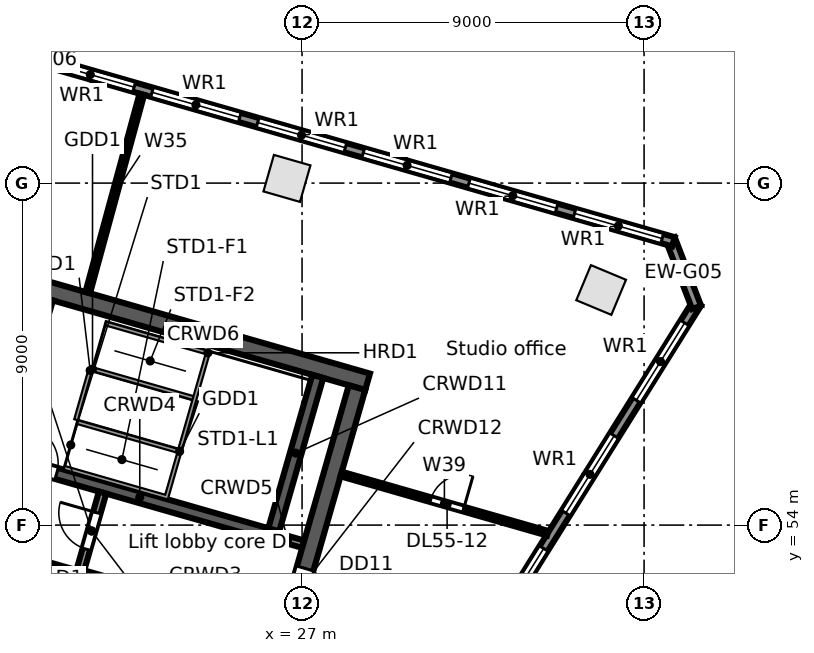
"""IFC4 building model, lengths in metres.
Left out: names, types, materials, properties, quantities, classifications, styles, units other than length and angle.
Written with IfcOpenShell. Run it as: python <this file> out.ifc"""

import sys

from ifc_helpers import new_model, si_unit, direction, frame, frame_2d, origin, origin_2d, place, context, subcontext, project, spatial, rectangle, extrude, element, fill, save


model = new_model("IFC4")
c1 = context("Model", 3, precision=1e-05, world=origin(), true_north=direction((0.0, 1.0)))
c2 = subcontext(c1, "Body", "Model", "MODEL_VIEW")
j1 = project(units=[si_unit("LENGTHUNIT", "METRE"), si_unit("PLANEANGLEUNIT", "RADIAN")], contexts=[c1])
p1 = place(None, origin())
s1 = spatial("IfcSite", under=j1, at=p1, CompositionType="ELEMENT")
p2 = place(p1, origin())
s2 = spatial("IfcBuilding", under=s1, at=p2, CompositionType="ELEMENT")
p3 = place(p2, frame((0.0, 0.0, 254.3)))
s3 = spatial("IfcBuildingStorey", under=s2, at=p3, CompositionType="ELEMENT", Elevation=254.3)
for number, where, z_axis, x_axis in (
    (1, (26.603, 63.124, 0.0), (0.0, 0.0, 1.0), (-0.961, 0.276, 0.0)),
    (2, (34.87, 60.187, 0.0), (0.0, 0.0, 1.0), (-0.923, 0.385, 0.0)),
):
    element("IfcColumn", number, at=place(p3, frame(where, z_axis=z_axis, x_axis=x_axis)), inside=s3, PredefinedType="COLUMN", context=c2, shape_type="SweptSolid", body=[
        extrude(rectangle(XDim=1.0, YDim=1.0, at=origin_2d()), origin(), (0.0, 0.0, 1.0), 3.9),
    ])
p4 = place(p3, frame((37.392, 59.84, 0.0), z_axis=(0.0, 0.0, 1.0), x_axis=(-0.529919909431, -0.848047692992, 0.0)))
e3 = element("IfcWall", 3, at=p4, inside=s3, PredefinedType="STANDARD", context=c2, shape_type="SweptSolid", body=[
    extrude(rectangle(XDim=21.104, YDim=0.25, at=frame_2d((10.552, 0.0))), origin(), (0.0, 0.0, 1.0), 3.55),
])
p5 = place(p4, frame((18.112, 0.0, 0.8)))
e4 = element("IfcOpeningElement", 4, at=p5, cuts=e3, PredefinedType="OPENING", context=c2, shape_type="SweptSolid", body=[
    extrude(rectangle(XDim=2.4, YDim=2.2, at=frame_2d((1.2, 1.1))), frame((0.0, 0.135, 0.0), z_axis=(0.0, -1.0, 0.0), x_axis=(1.0, 0.0, 0.0)), (0.0, 0.0, 1.0), 0.27),
])
p6 = place(p4, frame((14.612, 0.0, 0.8)))
e5 = element("IfcOpeningElement", 5, at=p6, cuts=e3, PredefinedType="OPENING", context=c2, shape_type="SweptSolid", body=[
    extrude(rectangle(XDim=2.4, YDim=2.2, at=frame_2d((1.2, 1.1))), frame((0.0, 0.135, 0.0), z_axis=(0.0, -1.0, 0.0), x_axis=(1.0, 0.0, 0.0)), (0.0, 0.0, 1.0), 0.27),
])
p7 = place(p4, frame((11.112, 0.0, 0.8)))
e6 = element("IfcOpeningElement", 6, at=p7, cuts=e3, PredefinedType="OPENING", context=c2, shape_type="SweptSolid", body=[
    extrude(rectangle(XDim=2.4, YDim=2.2, at=frame_2d((1.2, 1.1))), frame((0.0, 0.135, 0.0), z_axis=(0.0, -1.0, 0.0), x_axis=(1.0, 0.0, 0.0)), (0.0, 0.0, 1.0), 0.27),
])
p8 = place(p4, frame((7.612, 0.0, 0.8)))
e7 = element("IfcOpeningElement", 7, at=p8, cuts=e3, PredefinedType="OPENING", context=c2, shape_type="SweptSolid", body=[
    extrude(rectangle(XDim=2.4, YDim=2.2, at=frame_2d((1.2, 1.1))), frame((0.0, 0.135, 0.0), z_axis=(0.0, -1.0, 0.0), x_axis=(1.0, 0.0, 0.0)), (0.0, 0.0, 1.0), 0.27),
])
p9 = place(p4, frame((4.112, 0.0, 0.8)))
e8 = element("IfcOpeningElement", 8, at=p9, cuts=e3, PredefinedType="OPENING", context=c2, shape_type="SweptSolid", body=[
    extrude(rectangle(XDim=2.4, YDim=2.2, at=frame_2d((1.2, 1.1))), frame((0.0, 0.135, 0.0), z_axis=(0.0, -1.0, 0.0), x_axis=(1.0, 0.0, 0.0)), (0.0, 0.0, 1.0), 0.27),
])
p10 = place(p4, frame((0.612, 0.0, 0.8)))
e9 = element("IfcOpeningElement", 9, at=p10, cuts=e3, PredefinedType="OPENING", context=c2, shape_type="SweptSolid", body=[
    extrude(rectangle(XDim=2.4, YDim=2.2, at=frame_2d((1.2, 1.1))), frame((0.0, 0.135, 0.0), z_axis=(0.0, -1.0, 0.0), x_axis=(1.0, 0.0, 0.0)), (0.0, 0.0, 1.0), 0.27),
])
p11 = place(p3, frame((36.69, 61.531, 0.0), z_axis=(0.0, 0.0, 1.0), x_axis=(0.358377147136, -0.933576895821, 0.0)))
e10 = element("IfcWall", 10, at=p11, inside=s3, PredefinedType="STANDARD", context=c2, shape_type="SweptSolid", body=[
    extrude(rectangle(XDim=1.93, YDim=0.25, at=frame_2d((0.965, 0.0))), origin(), (0.0, 0.0, 1.0), 3.55),
])
p12 = place(p3, frame((3.34, 71.042, 0.0), z_axis=(0.0, 0.0, 1.0), x_axis=(0.96126179431, -0.275637012753, 0.0)))
e11 = element("IfcWall", 11, at=p12, inside=s3, PredefinedType="STANDARD", context=c2, shape_type="SweptSolid", body=[
    extrude(rectangle(XDim=34.779, YDim=0.25, at=frame_2d((17.39, 0.0))), origin(), (0.0, 0.0, 1.0), 3.55),
])
p13 = place(p12, frame((32.071, 0.0, 0.8)))
e12 = element("IfcOpeningElement", 12, at=p13, cuts=e11, PredefinedType="OPENING", context=c2, shape_type="SweptSolid", body=[
    extrude(rectangle(XDim=2.4, YDim=2.2, at=frame_2d((1.2, 1.1))), frame((0.0, 0.135, 0.0), z_axis=(0.0, -1.0, 0.0), x_axis=(1.0, 0.0, 0.0)), (0.0, 0.0, 1.0), 0.27),
])
p14 = place(p12, frame((29.18, 0.0, 0.8)))
e13 = element("IfcOpeningElement", 13, at=p14, cuts=e11, PredefinedType="OPENING", context=c2, shape_type="SweptSolid", body=[
    extrude(rectangle(XDim=2.4, YDim=2.2, at=frame_2d((1.2, 1.1))), frame((0.0, 0.135, 0.0), z_axis=(0.0, -1.0, 0.0), x_axis=(1.0, 0.0, 0.0)), (0.0, 0.0, 1.0), 0.27),
])
p15 = place(p12, frame((26.289, 0.0, 0.8)))
e14 = element("IfcOpeningElement", 14, at=p15, cuts=e11, PredefinedType="OPENING", context=c2, shape_type="SweptSolid", body=[
    extrude(rectangle(XDim=2.4, YDim=2.2, at=frame_2d((1.2, 1.1))), frame((0.0, 0.135, 0.0), z_axis=(0.0, -1.0, 0.0), x_axis=(1.0, 0.0, 0.0)), (0.0, 0.0, 1.0), 0.27),
])
p16 = place(p12, frame((23.398, 0.0, 0.8)))
e15 = element("IfcOpeningElement", 15, at=p16, cuts=e11, PredefinedType="OPENING", context=c2, shape_type="SweptSolid", body=[
    extrude(rectangle(XDim=2.4, YDim=2.2, at=frame_2d((1.2, 1.1))), frame((0.0, 0.135, 0.0), z_axis=(0.0, -1.0, 0.0), x_axis=(1.0, 0.0, 0.0)), (0.0, 0.0, 1.0), 0.27),
])
p17 = place(p12, frame((20.508, 0.0, 0.8)))
e16 = element("IfcOpeningElement", 16, at=p17, cuts=e11, PredefinedType="OPENING", context=c2, shape_type="SweptSolid", body=[
    extrude(rectangle(XDim=2.4, YDim=2.2, at=frame_2d((1.2, 1.1))), frame((0.0, 0.135, 0.0), z_axis=(0.0, -1.0, 0.0), x_axis=(1.0, 0.0, 0.0)), (0.0, 0.0, 1.0), 0.27),
])
p18 = place(p12, frame((17.616, 0.0, 0.8)))
e17 = element("IfcOpeningElement", 17, at=p18, cuts=e11, PredefinedType="OPENING", context=c2, shape_type="SweptSolid", body=[
    extrude(rectangle(XDim=2.4, YDim=2.2, at=frame_2d((1.2, 1.1))), frame((0.0, 0.135, 0.0), z_axis=(0.0, -1.0, 0.0), x_axis=(1.0, 0.0, 0.0)), (0.0, 0.0, 1.0), 0.27),
])
p19 = place(p12, frame((14.726, 0.0, 0.8)))
e18 = element("IfcOpeningElement", 18, at=p19, cuts=e11, PredefinedType="OPENING", context=c2, shape_type="SweptSolid", body=[
    extrude(rectangle(XDim=2.4, YDim=2.2, at=frame_2d((1.2, 1.1))), frame((0.0, 0.135, 0.0), z_axis=(0.0, -1.0, 0.0), x_axis=(1.0, 0.0, 0.0)), (0.0, 0.0, 1.0), 0.27),
])
p20 = place(p12, frame((11.834, 0.0, 0.8)))
e19 = element("IfcOpeningElement", 19, at=p20, cuts=e11, PredefinedType="OPENING", context=c2, shape_type="SweptSolid", body=[
    extrude(rectangle(XDim=2.4, YDim=2.2, at=frame_2d((1.2, 1.1))), frame((0.0, 0.135, 0.0), z_axis=(0.0, -1.0, 0.0), x_axis=(1.0, 0.0, 0.0)), (0.0, 0.0, 1.0), 0.27),
])
p21 = place(p12, frame((8.944, 0.0, 0.8)))
e20 = element("IfcOpeningElement", 20, at=p21, cuts=e11, PredefinedType="OPENING", context=c2, shape_type="SweptSolid", body=[
    extrude(rectangle(XDim=2.4, YDim=2.2, at=frame_2d((1.2, 1.1))), frame((0.0, 0.135, 0.0), z_axis=(0.0, -1.0, 0.0), x_axis=(1.0, 0.0, 0.0)), (0.0, 0.0, 1.0), 0.27),
])
p22 = place(p12, frame((6.052, 0.0, 0.8)))
e21 = element("IfcOpeningElement", 21, at=p22, cuts=e11, PredefinedType="OPENING", context=c2, shape_type="SweptSolid", body=[
    extrude(rectangle(XDim=2.4, YDim=2.2, at=frame_2d((1.2, 1.1))), frame((0.0, 0.135, 0.0), z_axis=(0.0, -1.0, 0.0), x_axis=(1.0, 0.0, 0.0)), (0.0, 0.0, 1.0), 0.27),
])
p23 = place(p12, frame((3.162, 0.0, 0.8)))
e22 = element("IfcOpeningElement", 22, at=p23, cuts=e11, PredefinedType="OPENING", context=c2, shape_type="SweptSolid", body=[
    extrude(rectangle(XDim=2.4, YDim=2.2, at=frame_2d((1.2, 1.1))), frame((0.0, 0.135, 0.0), z_axis=(0.0, -1.0, 0.0), x_axis=(1.0, 0.0, 0.0)), (0.0, 0.0, 1.0), 0.27),
])
p24 = place(p12, frame((0.271, 0.0, 0.8)))
e23 = element("IfcOpeningElement", 23, at=p24, cuts=e11, PredefinedType="OPENING", context=c2, shape_type="SweptSolid", body=[
    extrude(rectangle(XDim=2.4, YDim=2.2, at=frame_2d((1.2, 1.1))), frame((0.0, 0.135, 0.0), z_axis=(0.0, -1.0, 0.0), x_axis=(1.0, 0.0, 0.0)), (0.0, 0.0, 1.0), 0.27),
])
p25 = place(p3, frame((18.583, 53.423, 0.0), z_axis=(0.0, 0.0, 1.0), x_axis=(0.961259287968, -0.275645753268, 0.0)))
e24 = element("IfcWall", 24, at=p25, inside=s3, PredefinedType="SOLIDWALL", context=c2, shape_type="SweptSolid", body=[
    extrude(rectangle(XDim=2.65, YDim=0.2, at=frame_2d((1.325, 0.0))), origin(), (0.0, 0.0, 1.0), 3.55),
])
p26 = place(p3, frame((21.131, 52.692, 0.0), z_axis=(0.0, 0.0, 1.0), x_axis=(0.961261488075, -0.275638080722, 0.0)))
e25 = element("IfcWall", 25, at=p26, inside=s3, PredefinedType="SOLIDWALL", context=c2, shape_type="SweptSolid", body=[
    extrude(rectangle(XDim=5.45, YDim=0.3, at=frame_2d((2.725, 0.0))), origin(), (0.0, 0.0, 1.0), 3.55),
])
p27 = place(p26, frame((0.95, 0.0, 0.0)))
e26 = element("IfcOpeningElement", 26, at=p27, cuts=e25, PredefinedType="OPENING", context=c2, shape_type="SweptSolid", body=[
    extrude(rectangle(XDim=0.9, YDim=2.1, at=frame_2d((0.45, 1.05))), frame((0.0, 0.16, 0.0), z_axis=(0.0, -1.0, 0.0), x_axis=(1.0, 0.0, 0.0)), (0.0, 0.0, 1.0), 0.32),
])
p28 = place(p26, frame((3.75, 0.0, 0.0)))
e27 = element("IfcOpeningElement", 27, at=p28, cuts=e25, PredefinedType="OPENING", context=c2, shape_type="SweptSolid", body=[
    extrude(rectangle(XDim=0.9, YDim=2.1, at=frame_2d((0.45, 1.05))), frame((0.0, 0.16, 0.0), z_axis=(0.0, -1.0, 0.0), x_axis=(1.0, 0.0, 0.0)), (0.0, 0.0, 1.0), 0.32),
])
p29 = place(p3, frame((19.245, 55.73, 0.0), z_axis=(0.0, 0.0, 1.0), x_axis=(0.961263007877, -0.275632780503, 0.0)))
e28 = element("IfcWall", 28, at=p29, inside=s3, PredefinedType="SOLIDWALL", context=c2, shape_type="SweptSolid", body=[
    extrude(rectangle(XDim=7.25, YDim=0.3, at=frame_2d((3.625, 0.0))), origin(), (0.0, 0.0, 1.0), 3.55),
])
p30 = place(p29, frame((0.35, 0.0, 0.0)))
e29 = element("IfcOpeningElement", 29, at=p30, cuts=e28, PredefinedType="OPENING", context=c2, shape_type="SweptSolid", body=[
    extrude(rectangle(XDim=1.0, YDim=2.1, at=frame_2d((0.5, 1.05))), frame((0.0, 0.16, 0.0), z_axis=(0.0, -1.0, 0.0), x_axis=(1.0, 0.0, 0.0)), (0.0, 0.0, 1.0), 0.32),
])
p31 = place(p3, frame((26.214, 53.732, 0.0), z_axis=(0.0, 0.0, 1.0), x_axis=(0.961241665642, -0.275707200184, 0.0)))
e30 = element("IfcWall", 30, at=p31, inside=s3, PredefinedType="SOLIDWALL", context=c2, shape_type="SweptSolid", body=[
    extrude(rectangle(XDim=0.85, YDim=0.2, at=frame_2d((0.425, 0.0))), origin(), (0.0, 0.0, 1.0), 3.55),
])
p32 = place(p3, frame((20.073, 60.252, 0.0), z_axis=(0.0, 0.0, 1.0), x_axis=(0.96126248289, -0.275634611374, 0.0)))
e31 = element("IfcWall", 31, at=p32, inside=s3, PredefinedType="SOLIDWALL", context=c2, shape_type="SweptSolid", body=[
    extrude(rectangle(XDim=9.0, YDim=0.45, at=frame_2d((4.5, 0.0))), origin(), (0.0, 0.0, 1.0), 3.55),
])
p33 = place(p3, frame((17.168, 49.303, 0.0), z_axis=(0.0, 0.0, 1.0), x_axis=(0.275638974822, 0.961261231695, 0.0)))
e32 = element("IfcWall", 32, at=p33, inside=s3, PredefinedType="SOLIDWALL", context=c2, shape_type="SweptSolid", body=[
    extrude(rectangle(XDim=11.1, YDim=0.45, at=frame_2d((5.55, 0.0))), origin(), (0.0, 0.0, 1.0), 3.55),
])
p34 = place(p33, frame((4.95, 0.0, 0.0)))
e33 = element("IfcOpeningElement", 33, at=p34, cuts=e32, PredefinedType="OPENING", context=c2, shape_type="SweptSolid", body=[
    extrude(rectangle(XDim=1.2, YDim=2.1, at=frame_2d((0.6, 1.05))), frame((0.0, 0.235, 0.0), z_axis=(0.0, -1.0, 0.0), x_axis=(1.0, 0.0, 0.0)), (0.0, 0.0, 1.0), 0.47),
])
p35 = place(p3, frame((21.172, 52.837, 0.0), z_axis=(0.0, 0.0, 1.0), x_axis=(0.275657676022, 0.961255868981, 0.0)))
e34 = element("IfcWall", 34, at=p35, inside=s3, PredefinedType="PARTITIONING", context=c2, shape_type="SweptSolid", body=[
    extrude(rectangle(XDim=2.1, YDim=0.2, at=frame_2d((1.05, 0.0))), origin(), (0.0, 0.0, 1.0), 3.55),
])
p36 = place(p35, frame((0.55, 0.0, 0.0)))
e35 = element("IfcOpeningElement", 35, at=p36, cuts=e34, PredefinedType="OPENING", context=c2, shape_type="SweptSolid", body=[
    extrude(rectangle(XDim=1.0, YDim=2.1, at=frame_2d((0.5, 1.05))), frame((0.0, 0.11, 0.0), z_axis=(0.0, -1.0, 0.0), x_axis=(1.0, 0.0, 0.0)), (0.0, 0.0, 1.0), 0.22),
])
p37 = place(p3, frame((26.256, 53.876, 0.0), z_axis=(0.0, 0.0, 1.0), x_axis=(0.275588560745, 0.96127568636, 0.0)))
e36 = element("IfcWall", 36, at=p37, inside=s3, PredefinedType="SOLIDWALL", context=c2, shape_type="SweptSolid", body=[
    extrude(rectangle(XDim=4.2, YDim=0.3, at=frame_2d((2.1, 0.0))), origin(), (0.0, 0.0, 1.0), 3.55),
])
p38 = place(p3, frame((25.387, 46.947, 0.0), z_axis=(0.0, 0.0, 1.0), x_axis=(0.275638974822, 0.961261231695, 0.0)))
e37 = element("IfcWall", 37, at=p38, inside=s3, PredefinedType="SOLIDWALL", context=c2, shape_type="SweptSolid", body=[
    extrude(rectangle(XDim=11.1, YDim=0.45, at=frame_2d((5.55, 0.0))), origin(), (0.0, 0.0, 1.0), 3.55),
])
p39 = place(p38, frame((4.95, 0.0, 0.0)))
e38 = element("IfcOpeningElement", 38, at=p39, cuts=e37, PredefinedType="OPENING", context=c2, shape_type="SweptSolid", body=[
    extrude(rectangle(XDim=1.2, YDim=2.1, at=frame_2d((0.6, 1.05))), frame((0.0, 0.235, 0.0), z_axis=(0.0, -1.0, 0.0), x_axis=(1.0, 0.0, 0.0)), (0.0, 0.0, 1.0), 0.47),
])
p40 = place(p3, frame((21.36, 60.117, 0.0), z_axis=(0.0, 0.0, 1.0), x_axis=(0.263151767798, 0.964754449124, 0.0)))
e39 = element("IfcWall", 39, at=p40, inside=s3, PredefinedType="PARTITIONING", context=c2, shape_type="SweptSolid", body=[
    extrude(rectangle(XDim=5.411, YDim=0.125, at=frame_2d((2.705, 0.0))), origin(), (0.0, 0.0, 1.0), 2.73),
])
p41 = place(p3, frame((28.029, 55.344, 0.0), z_axis=(0.0, 0.0, 1.0), x_axis=(0.961249621014, -0.275679462603, 0.0)))
e40 = element("IfcWall", 40, at=p41, inside=s3, PredefinedType="PARTITIONING", context=c2, shape_type="SweptSolid", body=[
    extrude(rectangle(XDim=5.652, YDim=0.125, at=frame_2d((2.826, 0.0))), origin(), (0.0, 0.0, 1.0), 2.73),
])
p42 = place(p41, frame((2.45, 0.0, 0.0)))
e41 = element("IfcOpeningElement", 41, at=p42, cuts=e40, PredefinedType="OPENING", context=c2, shape_type="SweptSolid", body=[
    extrude(rectangle(XDim=0.9, YDim=2.1, at=frame_2d((0.45, 1.05))), frame((0.0, 0.073, 0.0), z_axis=(0.0, -1.0, 0.0), x_axis=(1.0, 0.0, 0.0)), (0.0, 0.0, 1.0), 0.145),
])
p43 = place(p8, origin())
e42 = element("IfcWindow", 42, at=p43, inside=s3, PartitioningType="SINGLE_PANEL", PredefinedType="WINDOW", context=c2, shape_type="SweptSolid", body=[
    extrude(rectangle(XDim=2.4, YDim=2.2, at=frame_2d((1.2, 1.1))), frame((0.0, 0.03, 0.0), z_axis=(0.0, -1.0, 0.0), x_axis=(1.0, 0.0, 0.0)), (0.0, 0.0, 1.0), 0.06),
])
fill(e7, e42)
p44 = place(p9, origin())
e43 = element("IfcWindow", 43, at=p44, inside=s3, PartitioningType="SINGLE_PANEL", PredefinedType="WINDOW", context=c2, shape_type="SweptSolid", body=[
    extrude(rectangle(XDim=2.4, YDim=2.2, at=frame_2d((1.2, 1.1))), frame((0.0, 0.03, 0.0), z_axis=(0.0, -1.0, 0.0), x_axis=(1.0, 0.0, 0.0)), (0.0, 0.0, 1.0), 0.06),
])
fill(e8, e43)
p45 = place(p10, origin())
e44 = element("IfcWindow", 44, at=p45, inside=s3, PartitioningType="SINGLE_PANEL", PredefinedType="WINDOW", context=c2, shape_type="SweptSolid", body=[
    extrude(rectangle(XDim=2.4, YDim=2.2, at=frame_2d((1.2, 1.1))), frame((0.0, 0.03, 0.0), z_axis=(0.0, -1.0, 0.0), x_axis=(1.0, 0.0, 0.0)), (0.0, 0.0, 1.0), 0.06),
])
fill(e9, e44)
p46 = place(p13, origin())
e45 = element("IfcWindow", 45, at=p46, inside=s3, PartitioningType="SINGLE_PANEL", PredefinedType="WINDOW", context=c2, shape_type="SweptSolid", body=[
    extrude(rectangle(XDim=2.4, YDim=2.2, at=frame_2d((1.2, 1.1))), frame((0.0, 0.03, 0.0), z_axis=(0.0, -1.0, 0.0), x_axis=(1.0, 0.0, 0.0)), (0.0, 0.0, 1.0), 0.06),
])
fill(e12, e45)
p47 = place(p14, origin())
e46 = element("IfcWindow", 46, at=p47, inside=s3, PartitioningType="SINGLE_PANEL", PredefinedType="WINDOW", context=c2, shape_type="SweptSolid", body=[
    extrude(rectangle(XDim=2.4, YDim=2.2, at=frame_2d((1.2, 1.1))), frame((0.0, 0.03, 0.0), z_axis=(0.0, -1.0, 0.0), x_axis=(1.0, 0.0, 0.0)), (0.0, 0.0, 1.0), 0.06),
])
fill(e13, e46)
p48 = place(p15, origin())
e47 = element("IfcWindow", 47, at=p48, inside=s3, PartitioningType="SINGLE_PANEL", PredefinedType="WINDOW", context=c2, shape_type="SweptSolid", body=[
    extrude(rectangle(XDim=2.4, YDim=2.2, at=frame_2d((1.2, 1.1))), frame((0.0, 0.03, 0.0), z_axis=(0.0, -1.0, 0.0), x_axis=(1.0, 0.0, 0.0)), (0.0, 0.0, 1.0), 0.06),
])
fill(e14, e47)
p49 = place(p16, origin())
e48 = element("IfcWindow", 48, at=p49, inside=s3, PartitioningType="SINGLE_PANEL", PredefinedType="WINDOW", context=c2, shape_type="SweptSolid", body=[
    extrude(rectangle(XDim=2.4, YDim=2.2, at=frame_2d((1.2, 1.1))), frame((0.0, 0.03, 0.0), z_axis=(0.0, -1.0, 0.0), x_axis=(1.0, 0.0, 0.0)), (0.0, 0.0, 1.0), 0.06),
])
fill(e15, e48)
p50 = place(p17, origin())
e49 = element("IfcWindow", 49, at=p50, inside=s3, PartitioningType="SINGLE_PANEL", PredefinedType="WINDOW", context=c2, shape_type="SweptSolid", body=[
    extrude(rectangle(XDim=2.4, YDim=2.2, at=frame_2d((1.2, 1.1))), frame((0.0, 0.03, 0.0), z_axis=(0.0, -1.0, 0.0), x_axis=(1.0, 0.0, 0.0)), (0.0, 0.0, 1.0), 0.06),
])
fill(e16, e49)
p51 = place(p18, origin())
e50 = element("IfcWindow", 50, at=p51, inside=s3, PartitioningType="SINGLE_PANEL", PredefinedType="WINDOW", context=c2, shape_type="SweptSolid", body=[
    extrude(rectangle(XDim=2.4, YDim=2.2, at=frame_2d((1.2, 1.1))), frame((0.0, 0.03, 0.0), z_axis=(0.0, -1.0, 0.0), x_axis=(1.0, 0.0, 0.0)), (0.0, 0.0, 1.0), 0.06),
])
fill(e17, e50)
p52 = place(p30, origin())
e51 = element("IfcDoor", 51, at=p52, inside=s3, OperationType="SINGLE_SWING_LEFT", PredefinedType="DOOR", context=c2, shape_type="SweptSolid", body=[
    extrude(rectangle(XDim=1.0, YDim=2.1, at=frame_2d((0.5, 1.05))), frame((0.0, 0.025, 0.0), z_axis=(0.0, -1.0, 0.0), x_axis=(1.0, 0.0, 0.0)), (0.0, 0.0, 1.0), 0.05),
])
fill(e29, e51)
p53 = place(p36, origin())
e52 = element("IfcDoor", 52, at=p53, inside=s3, OperationType="SINGLE_SWING_RIGHT", PredefinedType="DOOR", context=c2, shape_type="SweptSolid", body=[
    extrude(rectangle(XDim=1.0, YDim=2.1, at=frame_2d((0.5, 1.05))), frame((0.0, 0.025, 0.0), z_axis=(0.0, -1.0, 0.0), x_axis=(1.0, 0.0, 0.0)), (0.0, 0.0, 1.0), 0.05),
])
fill(e35, e52)
p54 = place(p39, frame((1.2, 0.0, 0.0), z_axis=(0.0, 0.0, 1.0), x_axis=(-1.0, 0.0, 0.0)))
e53 = element("IfcDoor", 53, at=p54, inside=s3, OperationType="SINGLE_SWING_RIGHT", PredefinedType="DOOR", context=c2, shape_type="SweptSolid", body=[
    extrude(rectangle(XDim=1.2, YDim=2.1, at=frame_2d((0.6, 1.05))), frame((0.0, 0.025, 0.0), z_axis=(0.0, -1.0, 0.0), x_axis=(1.0, 0.0, 0.0)), (0.0, 0.0, 1.0), 0.05),
])
fill(e38, e53)
p55 = place(p42, origin())
e54 = element("IfcDoor", 54, at=p55, inside=s3, OperationType="SINGLE_SWING_RIGHT", PredefinedType="DOOR", context=c2, shape_type="SweptSolid", body=[
    extrude(rectangle(XDim=0.9, YDim=2.1, at=frame_2d((0.45, 1.05))), frame((0.0, 0.025, 0.0), z_axis=(0.0, -1.0, 0.0), x_axis=(1.0, 0.0, 0.0)), (0.0, 0.0, 1.0), 0.05),
])
fill(e41, e54)
save(model, sys.argv[1])
